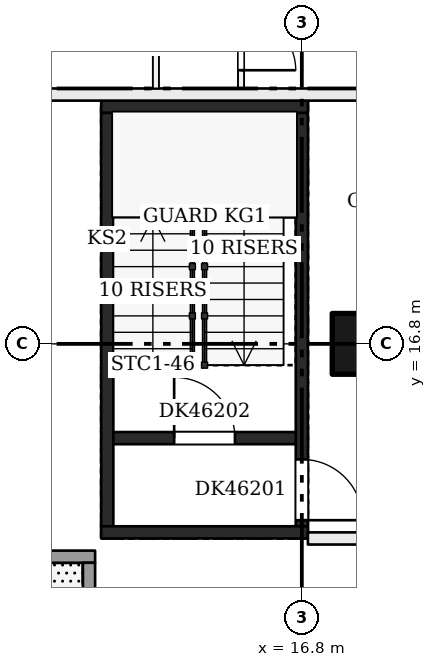
"""IFC4 building model, lengths in metres.
Left out: names, types, materials, properties, quantities, classifications, styles, units other than length and angle.
Written with IfcOpenShell. Run it as: python <this file> out.ifc"""

import sys

from ifc_helpers import new_model, si_unit, direction, frame, frame_2d, origin, origin_2d, place, context, subcontext, project, spatial, rectangle, extrude, element, fill, save


model = new_model("IFC4")
c1 = context("Model", 3, precision=1e-05, world=origin(), true_north=direction((0.0, 1.0)))
c2 = subcontext(c1, "Body", "Model", "MODEL_VIEW")
j1 = project(units=[si_unit("LENGTHUNIT", "METRE"), si_unit("PLANEANGLEUNIT", "RADIAN")], contexts=[c1])
p1 = place(None, origin())
s1 = spatial("IfcSite", under=j1, at=p1, CompositionType="ELEMENT")
p2 = place(p1, origin())
s2 = spatial("IfcBuilding", under=s1, at=p2, CompositionType="ELEMENT")
p3 = place(p2, frame((0.0, 0.0, 179.2)))
s3 = spatial("IfcBuildingStorey", under=s2, at=p3, CompositionType="ELEMENT", Elevation=179.2)
p4 = place(p3, frame((17.8, 16.8, 0.0), z_axis=(0.0, 0.0, 1.0), x_axis=(1.0, 0.0, 0.0)))
e1 = element("IfcColumn", 1, at=p4, inside=s3, PredefinedType="COLUMN", context=c2, shape_type="SweptSolid", body=[
    extrude(rectangle(XDim=1.0, YDim=1.0, at=origin_2d()), origin(), (0.0, 0.0, 1.0), 3.22),
])
p5 = place(p3, frame((13.6, 13.8, 0.0), z_axis=(0.0, 0.0, 1.0), x_axis=(0.0, 1.0, 0.0)))
e2 = element("IfcWall", 2, at=p5, inside=s3, PredefinedType="SHEAR", context=c2, shape_type="SweptSolid", body=[
    extrude(rectangle(XDim=6.8, YDim=0.2, at=frame_2d((3.4, 0.0))), origin(), (0.0, 0.0, 1.0), 3.22),
])
p6 = place(p3, frame((16.8, 13.8, 0.0), z_axis=(0.0, 0.0, 1.0), x_axis=(0.0, 1.0, 0.0)))
e3 = element("IfcWall", 3, at=p6, inside=s3, PredefinedType="SHEAR", context=c2, shape_type="SweptSolid", body=[
    extrude(rectangle(XDim=6.8, YDim=0.2, at=frame_2d((3.4, 0.0))), origin(), (0.0, 0.0, 1.0), 3.22),
])
p7 = place(p6, frame((0.1, 0.0, 0.0)))
e4 = element("IfcOpeningElement", 4, at=p7, cuts=e3, PredefinedType="OPENING", context=c2, shape_type="SweptSolid", body=[
    extrude(rectangle(XDim=1.0, YDim=2.1, at=frame_2d((0.5, 1.05))), frame((0.0, 0.11, 0.0), z_axis=(0.0, -1.0, 0.0), x_axis=(1.0, 0.0, 0.0)), (0.0, 0.0, 1.0), 0.22),
])
for number, where, z_axis, x_axis in (
    (5, (13.5, 13.7, 0.0), (0.0, 0.0, 1.0), (1.0, 0.0, 0.0)),
    (6, (13.5, 20.7, 0.0), (0.0, 0.0, 1.0), (1.0, 0.0, 0.0)),
):
    element("IfcWall", number, at=place(p3, frame(where, z_axis=z_axis, x_axis=x_axis)), inside=s3, PredefinedType="SHEAR", context=c2, shape_type="SweptSolid", body=[
        extrude(rectangle(XDim=3.4, YDim=0.2, at=frame_2d((1.7, 0.0))), origin(), (0.0, 0.0, 1.0), 3.22),
    ])
p8 = place(p3, frame((13.7, 15.25, 0.0), z_axis=(0.0, 0.0, 1.0), x_axis=(1.0, 0.0, 0.0)))
e7 = element("IfcWall", 7, at=p8, inside=s3, PredefinedType="SHEAR", context=c2, shape_type="SweptSolid", body=[
    extrude(rectangle(XDim=3.0, YDim=0.2, at=frame_2d((1.5, 0.0))), origin(), (0.0, 0.0, 1.0), 3.22),
])
p9 = place(p8, frame((1.0, 0.0, 0.0)))
e8 = element("IfcOpeningElement", 8, at=p9, cuts=e7, PredefinedType="OPENING", context=c2, shape_type="SweptSolid", body=[
    extrude(rectangle(XDim=1.0, YDim=2.1, at=frame_2d((0.5, 1.05))), frame((0.0, 0.11, 0.0), z_axis=(0.0, -1.0, 0.0), x_axis=(1.0, 0.0, 0.0)), (0.0, 0.0, 1.0), 0.22),
])
p10 = place(p3, frame((16.9, 13.6, 0.0), z_axis=(0.0, 0.0, 1.0), x_axis=(1.0, 0.0, 0.0)))
e9 = element("IfcWall", 9, at=p10, inside=s3, PredefinedType="PARTITIONING", context=c2, shape_type="SweptSolid", body=[
    extrude(rectangle(XDim=4.2, YDim=0.2, at=frame_2d((2.1, 0.0))), origin(), (0.0, 0.0, 1.0), 3.22),
])
p11 = place(p10, frame((1.6, 0.0, 0.0)))
e10 = element("IfcOpeningElement", 10, at=p11, cuts=e9, PredefinedType="OPENING", context=c2, shape_type="SweptSolid", body=[
    extrude(rectangle(XDim=1.0, YDim=2.1, at=frame_2d((0.5, 1.05))), frame((0.0, 0.11, 0.0), z_axis=(0.0, -1.0, 0.0), x_axis=(1.0, 0.0, 0.0)), (0.0, 0.0, 1.0), 0.22),
])
p12 = place(p3, frame((10.9, 20.9, 0.0), z_axis=(0.0, 0.0, 1.0), x_axis=(1.0, 0.0, 0.0)))
e11 = element("IfcWall", 11, at=p12, inside=s3, PredefinedType="PARTITIONING", context=c2, shape_type="SweptSolid", body=[
    extrude(rectangle(XDim=8.3, YDim=0.2, at=frame_2d((4.15, 0.0))), origin(), (0.0, 0.0, 1.0), 3.22),
])
p13 = place(p3, frame((14.4, 21.0, 0.0), z_axis=(0.0, 0.0, 1.0), x_axis=(0.0, 1.0, 0.0)))
e12 = element("IfcWall", 12, at=p13, inside=s3, PredefinedType="PARTITIONING", context=c2, shape_type="SweptSolid", body=[
    extrude(rectangle(XDim=19.0, YDim=0.1, at=frame_2d((9.5, 0.0))), origin(), (0.0, 0.0, 1.0), 3.22),
])
p14 = place(p13, frame((1.6, 0.0, 0.0)))
e13 = element("IfcOpeningElement", 13, at=p14, cuts=e12, PredefinedType="OPENING", context=c2, shape_type="SweptSolid", body=[
    extrude(rectangle(XDim=0.9, YDim=2.1, at=frame_2d((0.45, 1.05))), frame((0.0, 0.06, 0.0), z_axis=(0.0, -1.0, 0.0), x_axis=(1.0, 0.0, 0.0)), (0.0, 0.0, 1.0), 0.12),
])
p15 = place(p13, frame((5.8, 0.0, 0.0)))
e14 = element("IfcOpeningElement", 14, at=p15, cuts=e12, PredefinedType="OPENING", context=c2, shape_type="SweptSolid", body=[
    extrude(rectangle(XDim=0.9, YDim=2.1, at=frame_2d((0.45, 1.05))), frame((0.0, 0.06, 0.0), z_axis=(0.0, -1.0, 0.0), x_axis=(1.0, 0.0, 0.0)), (0.0, 0.0, 1.0), 0.12),
])
p16 = place(p13, frame((10.0, 0.0, 0.0)))
e15 = element("IfcOpeningElement", 15, at=p16, cuts=e12, PredefinedType="OPENING", context=c2, shape_type="SweptSolid", body=[
    extrude(rectangle(XDim=0.9, YDim=2.1, at=frame_2d((0.45, 1.05))), frame((0.0, 0.06, 0.0), z_axis=(0.0, -1.0, 0.0), x_axis=(1.0, 0.0, 0.0)), (0.0, 0.0, 1.0), 0.12),
])
p17 = place(p13, frame((15.4, 0.0, 0.0)))
e16 = element("IfcOpeningElement", 16, at=p17, cuts=e12, PredefinedType="OPENING", context=c2, shape_type="SweptSolid", body=[
    extrude(rectangle(XDim=0.9, YDim=2.1, at=frame_2d((0.45, 1.05))), frame((0.0, 0.06, 0.0), z_axis=(0.0, -1.0, 0.0), x_axis=(1.0, 0.0, 0.0)), (0.0, 0.0, 1.0), 0.12),
])
p18 = place(p3, frame((15.8, 21.0, 0.0), z_axis=(0.0, 0.0, 1.0), x_axis=(0.0, 1.0, 0.0)))
e17 = element("IfcWall", 17, at=p18, inside=s3, PredefinedType="PARTITIONING", context=c2, shape_type="SweptSolid", body=[
    extrude(rectangle(XDim=8.3, YDim=0.1, at=frame_2d((4.15, 0.0))), origin(), (0.0, 0.0, 1.0), 3.22),
])
p19 = place(p18, frame((2.2, 0.0, 0.0)))
e18 = element("IfcOpeningElement", 18, at=p19, cuts=e17, PredefinedType="OPENING", context=c2, shape_type="SweptSolid", body=[
    extrude(rectangle(XDim=0.9, YDim=2.1, at=frame_2d((0.45, 1.05))), frame((0.0, 0.06, 0.0), z_axis=(0.0, -1.0, 0.0), x_axis=(1.0, 0.0, 0.0)), (0.0, 0.0, 1.0), 0.12),
])
p20 = place(p18, frame((0.3, 0.0, 0.0)))
e19 = element("IfcOpeningElement", 19, at=p20, cuts=e17, PredefinedType="OPENING", context=c2, shape_type="SweptSolid", body=[
    extrude(rectangle(XDim=0.9, YDim=2.1, at=frame_2d((0.45, 1.05))), frame((0.0, 0.06, 0.0), z_axis=(0.0, -1.0, 0.0), x_axis=(1.0, 0.0, 0.0)), (0.0, 0.0, 1.0), 0.12),
])
p21 = place(p18, frame((4.863, 0.0, 0.0)))
e20 = element("IfcOpeningElement", 20, at=p21, cuts=e17, PredefinedType="OPENING", context=c2, shape_type="SweptSolid", body=[
    extrude(rectangle(XDim=0.9, YDim=2.1, at=frame_2d((0.45, 1.05))), frame((0.0, 0.06, 0.0), z_axis=(0.0, -1.0, 0.0), x_axis=(1.0, 0.0, 0.0)), (0.0, 0.0, 1.0), 0.12),
])
p22 = place(p18, frame((6.825, 0.0, 0.0)))
e21 = element("IfcOpeningElement", 21, at=p22, cuts=e17, PredefinedType="OPENING", context=c2, shape_type="SweptSolid", body=[
    extrude(rectangle(XDim=0.9, YDim=2.1, at=frame_2d((0.45, 1.05))), frame((0.0, 0.06, 0.0), z_axis=(0.0, -1.0, 0.0), x_axis=(1.0, 0.0, 0.0)), (0.0, 0.0, 1.0), 0.12),
])
p23 = place(p3, frame((10.8, 13.3, 0.0), z_axis=(0.0, 0.0, 1.0), x_axis=(1.0, 0.0, 0.0)))
e22 = element("IfcWall", 22, at=p23, inside=s3, PredefinedType="SOLIDWALL", context=c2, shape_type="SweptSolid", body=[
    extrude(rectangle(XDim=2.6, YDim=0.2, at=frame_2d((1.3, 0.0))), origin(), (0.0, 0.0, 1.0), 3.22),
])
p24 = place(p3, frame((13.3, 13.2, 0.0), z_axis=(0.0, 0.0, 1.0), x_axis=(0.0, -1.0, 0.0)))
e23 = element("IfcWall", 23, at=p24, inside=s3, PredefinedType="SOLIDWALL", context=c2, shape_type="SweptSolid", body=[
    extrude(rectangle(XDim=2.2, YDim=0.2, at=frame_2d((1.1, 0.0))), origin(), (0.0, 0.0, 1.0), 3.22),
])
p25 = place(p7, frame((1.0, 0.0, 0.0), z_axis=(0.0, 0.0, 1.0), x_axis=(-1.0, 0.0, 0.0)))
e24 = element("IfcDoor", 24, at=p25, inside=s3, OperationType="SINGLE_SWING_RIGHT", PredefinedType="DOOR", context=c2, shape_type="SweptSolid", body=[
    extrude(rectangle(XDim=1.0, YDim=2.1, at=frame_2d((0.5, 1.05))), frame((0.0, 0.025, 0.0), z_axis=(0.0, -1.0, 0.0), x_axis=(1.0, 0.0, 0.0)), (0.0, 0.0, 1.0), 0.05),
])
fill(e4, e24)
p26 = place(p9, origin())
e25 = element("IfcDoor", 25, at=p26, inside=s3, OperationType="SINGLE_SWING_LEFT", PredefinedType="DOOR", context=c2, shape_type="SweptSolid", body=[
    extrude(rectangle(XDim=1.0, YDim=2.1, at=frame_2d((0.5, 1.05))), frame((0.0, 0.025, 0.0), z_axis=(0.0, -1.0, 0.0), x_axis=(1.0, 0.0, 0.0)), (0.0, 0.0, 1.0), 0.05),
])
fill(e8, e25)
p27 = place(p20, frame((0.9, 0.0, 0.0), z_axis=(0.0, 0.0, 1.0), x_axis=(-1.0, 0.0, 0.0)))
e26 = element("IfcDoor", 26, at=p27, inside=s3, OperationType="SINGLE_SWING_RIGHT", PredefinedType="DOOR", context=c2, shape_type="SweptSolid", body=[
    extrude(rectangle(XDim=0.9, YDim=2.1, at=frame_2d((0.45, 1.05))), frame((0.0, 0.025, 0.0), z_axis=(0.0, -1.0, 0.0), x_axis=(1.0, 0.0, 0.0)), (0.0, 0.0, 1.0), 0.05),
])
fill(e19, e26)
save(model, sys.argv[1])
